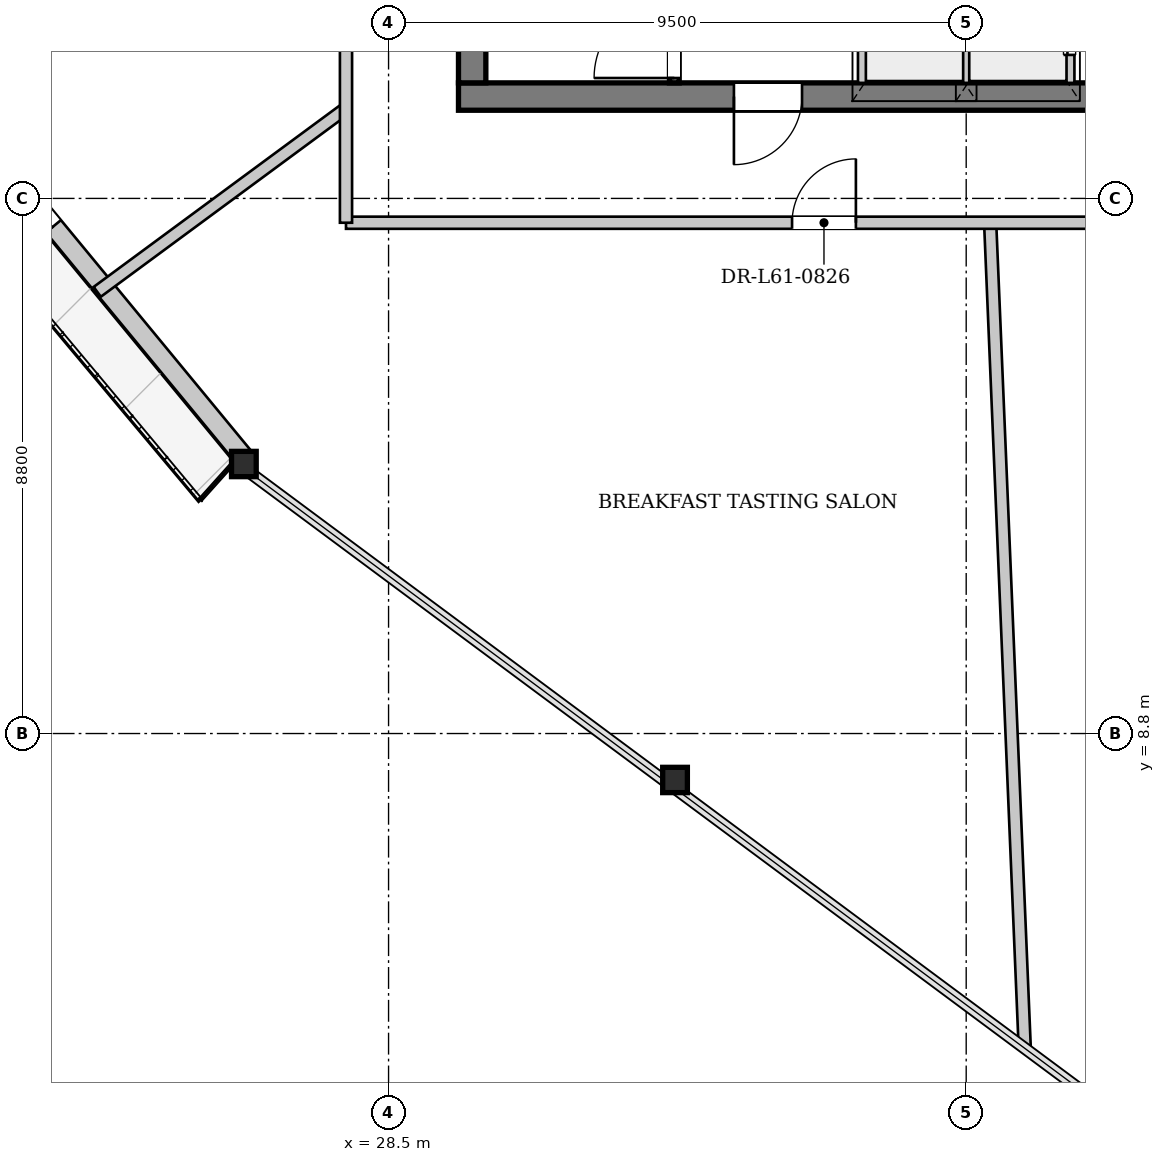
"""IFC4 building model, lengths in metres.
Left out: names, types, materials, properties, quantities, classifications, styles, units other than length and angle.
Written with IfcOpenShell. Run it as: python <this file> out.ifc"""

import sys

from ifc_helpers import new_model, si_unit, direction, frame, frame_2d, origin, origin_2d, place, context, subcontext, project, spatial, rectangle, i_section, extrude, source, transform, mapped, element, fill, save


model = new_model("IFC4")
c1 = context("Model", 3, precision=1e-05, world=origin(), true_north=direction((0.0, 1.0)))
c2 = subcontext(c1, "Body", "Model", "MODEL_VIEW")
j1 = project(units=[si_unit("LENGTHUNIT", "METRE"), si_unit("PLANEANGLEUNIT", "RADIAN")], contexts=[c1])
p1 = place(None, origin())
s1 = spatial("IfcSite", under=j1, at=p1, CompositionType="ELEMENT")
p2 = place(p1, origin())
s2 = spatial("IfcBuilding", under=s1, at=p2, CompositionType="ELEMENT")
p3 = place(p2, frame((0.0, 0.0, 230.9)))
s3 = spatial("IfcBuildingStorey", under=s2, at=p3, CompositionType="ELEMENT", Elevation=230.9)
m1 = source(origin(), c2, "Body", "SweptSolid", [
    extrude(i_section(OverallWidth=0.406, OverallDepth=0.416, WebThickness=0.027, FlangeThickness=0.042, at=origin_2d()), origin(), (0.0, 0.0, 1.0), 3.449),
])
p4 = place(p3, frame((25.969, 13.275, 0.0), z_axis=(0.087482925626, -0.024631114982, 0.995861459189), x_axis=(0.271016201839, 0.962574785843, 0.0)))
e1 = element("IfcColumn", 1, at=p4, inside=s3, PredefinedType="COLUMN", context=c2, shape_type="MappedRepresentation", body=[
    mapped(m1, transform((0.0, 0.0, 0.0), x_axis=(1.0, 0.0, 0.0), y_axis=(0.0, 1.0, 0.0), z_axis=(0.0, 0.0, 1.0), scale=1.0)),
])
m2 = source(origin(), c2, "Body", "SweptSolid", [
    extrude(i_section(OverallWidth=0.406, OverallDepth=0.416, WebThickness=0.027, FlangeThickness=0.042, at=origin_2d()), origin(), (0.0, 0.0, 1.0), 3.454),
])
p5 = place(p3, frame((33.032, 8.029, 0.0), z_axis=(0.103911055621, 0.004311955369, 0.994577246653), x_axis=(-0.041460916814, 0.999140126497, 0.0)))
e2 = element("IfcColumn", 2, at=p5, inside=s3, PredefinedType="COLUMN", context=c2, shape_type="MappedRepresentation", body=[
    mapped(m2, transform((0.0, 0.0, 0.0), x_axis=(1.0, 0.0, 0.0), y_axis=(0.0, 1.0, 0.0), z_axis=(0.0, 0.0, 1.0), scale=1.0)),
])
m3 = source(origin(), c2, "Body", "SweptSolid", [
    extrude(i_section(OverallWidth=0.305, OverallDepth=0.62, WebThickness=0.021, FlangeThickness=0.04, at=origin_2d()), origin(), (0.0, 0.0, 1.0), 3.462),
])
p6 = place(p3, frame((40.095, 2.783, 0.0), z_axis=(0.120094666546, 0.033144153421, 0.992209018383), x_axis=(-0.266037825823, 0.963962590162, 0.0)))
e3 = element("IfcColumn", 3, at=p6, inside=s3, PredefinedType="COLUMN", context=c2, shape_type="MappedRepresentation", body=[
    mapped(m3, transform((0.0, 0.0, 0.0), x_axis=(1.0, 0.0, 0.0), y_axis=(0.0, 1.0, 0.0), z_axis=(0.0, 0.0, 1.0), scale=1.0)),
])
p7 = place(p3, frame((26.093, 13.376, 0.0), z_axis=(0.0, 0.0, 1.0), x_axis=(-0.636168686104, 0.771550000208, 0.0)))
e4 = element("IfcWall", 4, at=p7, inside=s3, PredefinedType="SOLIDWALL", context=c2, shape_type="SweptSolid", body=[
    extrude(rectangle(XDim=17.595, YDim=0.32, at=frame_2d((8.798, 0.0))), origin(), (0.0, 0.0, 1.0), 2.872),
])
p8 = place(p7, frame((4.88, 0.0, 0.0)))
e5 = element("IfcOpeningElement", 5, at=p8, cuts=e4, PredefinedType="OPENING", context=c2, shape_type="SweptSolid", body=[
    extrude(rectangle(XDim=1.5, YDim=2.3, at=frame_2d((0.75, 1.15))), frame((0.0, 0.17, 0.0), z_axis=(0.0, -1.0, 0.0), x_axis=(1.0, 0.0, 0.0)), (0.0, 0.0, 1.0), 0.34),
])
p9 = place(p7, frame((11.721, 0.0, 0.402)))
e6 = element("IfcOpeningElement", 6, at=p9, cuts=e4, PredefinedType="OPENING", context=c2, shape_type="SweptSolid", body=[
    extrude(rectangle(XDim=2.6, YDim=2.35, at=frame_2d((1.3, 1.175))), frame((0.0, 0.17, 0.0), z_axis=(0.0, -1.0, 0.0), x_axis=(1.0, 0.0, 0.0)), (0.0, 0.0, 1.0), 0.34),
])
p10 = place(p3, frame((46.35, 19.275, 0.0), z_axis=(0.0, 0.0, 1.0), x_axis=(-1.0, 0.0, 0.0)))
e7 = element("IfcWall", 7, at=p10, inside=s3, PredefinedType="SHEAR", context=c2, shape_type="SweptSolid", body=[
    extrude(rectangle(XDim=16.7, YDim=0.45, at=frame_2d((8.35, 0.0))), origin(), (0.0, 0.0, 1.0), 3.38),
])
p11 = place(p10, frame((4.55, 0.0, 0.0)))
e8 = element("IfcOpeningElement", 8, at=p11, cuts=e7, PredefinedType="OPENING", context=c2, shape_type="SweptSolid", body=[
    extrude(rectangle(XDim=1.12, YDim=2.25, at=frame_2d((0.56, 1.125))), frame((0.0, 0.235, 0.0), z_axis=(0.0, -1.0, 0.0), x_axis=(1.0, 0.0, 0.0)), (0.0, 0.0, 1.0), 0.47),
])
p12 = place(p10, frame((11.05, 0.0, 0.0)))
e9 = element("IfcOpeningElement", 9, at=p12, cuts=e7, PredefinedType="OPENING", context=c2, shape_type="SweptSolid", body=[
    extrude(rectangle(XDim=1.12, YDim=2.25, at=frame_2d((0.56, 1.125))), frame((0.0, 0.235, 0.0), z_axis=(0.0, -1.0, 0.0), x_axis=(1.0, 0.0, 0.0)), (0.0, 0.0, 1.0), 0.47),
])
p13 = place(p3, frame((29.875, 19.5, 0.0), z_axis=(0.0, 0.0, 1.0), x_axis=(0.0, 1.0, 0.0)))
e10 = element("IfcWall", 10, at=p13, inside=s3, PredefinedType="SHEAR", context=c2, shape_type="SweptSolid", body=[
    extrude(rectangle(XDim=14.2, YDim=0.45, at=frame_2d((7.1, 0.0))), origin(), (0.0, 0.0, 1.0), 3.38),
])
p14 = place(p13, frame((7.42, 0.0, 0.0)))
e11 = element("IfcOpeningElement", 11, at=p14, cuts=e10, PredefinedType="OPENING", context=c2, shape_type="SweptSolid", body=[
    extrude(rectangle(XDim=1.6, YDim=2.2, at=frame_2d((0.8, 1.1))), frame((0.0, 0.235, 0.0), z_axis=(0.0, -1.0, 0.0), x_axis=(1.0, 0.0, 0.0)), (0.0, 0.0, 1.0), 0.47),
])
p15 = place(p3, frame((33.2, 19.5, 0.0), z_axis=(0.0, 0.0, 1.0), x_axis=(0.0, 1.0, 0.0)))
e12 = element("IfcWall", 12, at=p15, inside=s3, PredefinedType="PARTITIONING", context=c2, shape_type="SweptSolid", body=[
    extrude(rectangle(XDim=7.46, YDim=0.16, at=frame_2d((3.73, 0.0))), origin(), (0.0, 0.0, 1.0), 3.38),
])
p16 = place(p15, frame((0.08, 0.0, 0.0)))
e13 = element("IfcOpeningElement", 13, at=p16, cuts=e12, PredefinedType="OPENING", context=c2, shape_type="SweptSolid", body=[
    extrude(rectangle(XDim=1.32, YDim=2.2, at=frame_2d((0.66, 1.1))), frame((0.0, 0.09, 0.0), z_axis=(0.0, -1.0, 0.0), x_axis=(1.0, 0.0, 0.0)), (0.0, 0.0, 1.0), 0.18),
])
p17 = place(p3, frame((36.3, 19.5, 0.0), z_axis=(0.0, 0.0, 1.0), x_axis=(0.0, 1.0, 0.0)))
e14 = element("IfcWall", 14, at=p17, inside=s3, PredefinedType="PARTITIONING", context=c2, shape_type="SweptSolid", body=[
    extrude(rectangle(XDim=4.78, YDim=0.16, at=frame_2d((2.39, 0.0))), origin(), (0.0, 0.0, 1.0), 3.38),
])
p18 = place(p17, frame((0.6, 0.0, 0.0)))
e15 = element("IfcOpeningElement", 15, at=p18, cuts=e14, PredefinedType="OPENING", context=c2, shape_type="SweptSolid", body=[
    extrude(rectangle(XDim=1.2, YDim=2.2, at=frame_2d((0.6, 1.1))), frame((0.0, 0.09, 0.0), z_axis=(0.0, -1.0, 0.0), x_axis=(1.0, 0.0, 0.0)), (0.0, 0.0, 1.0), 0.18),
])
p19 = place(p17, frame((2.65, 0.0, 0.0)))
e16 = element("IfcOpeningElement", 16, at=p19, cuts=e14, PredefinedType="OPENING", context=c2, shape_type="SweptSolid", body=[
    extrude(rectangle(XDim=0.95, YDim=2.1, at=frame_2d((0.475, 1.05))), frame((0.0, 0.09, 0.0), z_axis=(0.0, -1.0, 0.0), x_axis=(1.0, 0.0, 0.0)), (0.0, 0.0, 1.0), 0.18),
])
p20 = place(p3, frame((39.7, 24.28, 0.0), z_axis=(0.0, 0.0, 1.0), x_axis=(0.0, -1.0, 0.0)))
e17 = element("IfcWall", 17, at=p20, inside=s3, PredefinedType="PARTITIONING", context=c2, shape_type="SweptSolid", body=[
    extrude(rectangle(XDim=4.78, YDim=0.16, at=frame_2d((2.39, 0.0))), origin(), (0.0, 0.0, 1.0), 3.38),
])
p21 = place(p20, frame((3.12, 0.0, 0.0)))
e18 = element("IfcOpeningElement", 18, at=p21, cuts=e17, PredefinedType="OPENING", context=c2, shape_type="SweptSolid", body=[
    extrude(rectangle(XDim=1.2, YDim=2.2, at=frame_2d((0.6, 1.1))), frame((0.0, 0.09, 0.0), z_axis=(0.0, -1.0, 0.0), x_axis=(1.0, 0.0, 0.0)), (0.0, 0.0, 1.0), 0.18),
])
p22 = place(p3, frame((38.0, 19.5, 0.0), z_axis=(0.0, 0.0, 1.0), x_axis=(0.0, 1.0, 0.0)))
e19 = element("IfcWall", 19, at=p22, inside=s3, PredefinedType="PARTITIONING", context=c2, shape_type="SweptSolid", body=[
    extrude(rectangle(XDim=2.46, YDim=0.125, at=frame_2d((1.23, 0.0))), origin(), (0.0, 0.0, 1.0), 3.38),
])
p23 = place(p3, frame((27.8, 19.08, 0.0), z_axis=(0.0, 0.0, 1.0), x_axis=(-0.804918187544, -0.593385803134, 0.0)))
e20 = element("IfcWall", 20, at=p23, inside=s3, PredefinedType="PARTITIONING", context=c2, shape_type="SweptSolid", body=[
    extrude(rectangle(XDim=5.083, YDim=0.2, at=frame_2d((2.542, 0.0))), origin(), (0.0, 0.0, 1.0), 3.38),
])
p24 = place(p3, frame((38.394, 17.2, 0.0), z_axis=(0.0, 0.0, 1.0), x_axis=(0.041874116011, -0.999122894547, 0.0)))
e21 = element("IfcWall", 21, at=p24, inside=s3, PredefinedType="PARTITIONING", context=c2, shape_type="SweptSolid", body=[
    extrude(rectangle(XDim=13.55, YDim=0.2, at=frame_2d((6.775, 0.0))), origin(), (0.0, 0.0, 1.0), 3.38),
])
p25 = place(p3, frame((27.8, 17.2, 0.0), z_axis=(0.0, 0.0, 1.0), x_axis=(1.0, 0.0, 0.0)))
e22 = element("IfcWall", 22, at=p25, inside=s3, PredefinedType="PARTITIONING", context=c2, shape_type="SweptSolid", body=[
    extrude(rectangle(XDim=20.4, YDim=0.2, at=frame_2d((10.2, 0.0))), origin(), (0.0, 0.0, 1.0), 3.38),
])
p26 = place(p25, frame((7.336, 0.0, 0.0)))
e23 = element("IfcOpeningElement", 23, at=p26, cuts=e22, PredefinedType="OPENING", context=c2, shape_type="SweptSolid", body=[
    extrude(rectangle(XDim=1.05, YDim=2.2, at=frame_2d((0.525, 1.1))), frame((0.0, 0.11, 0.0), z_axis=(0.0, -1.0, 0.0), x_axis=(1.0, 0.0, 0.0)), (0.0, 0.0, 1.0), 0.22),
])
p27 = place(p25, frame((14.156, 0.0, 0.0)))
e24 = element("IfcOpeningElement", 24, at=p27, cuts=e22, PredefinedType="OPENING", context=c2, shape_type="SweptSolid", body=[
    extrude(rectangle(XDim=1.05, YDim=2.2, at=frame_2d((0.525, 1.1))), frame((0.0, 0.11, 0.0), z_axis=(0.0, -1.0, 0.0), x_axis=(1.0, 0.0, 0.0)), (0.0, 0.0, 1.0), 0.22),
])
p28 = place(p3, frame((27.8, 17.2, 0.0), z_axis=(0.0, 0.0, 1.0), x_axis=(0.0, 1.0, 0.0)))
e25 = element("IfcWall", 25, at=p28, inside=s3, PredefinedType="PARTITIONING", context=c2, shape_type="SweptSolid", body=[
    extrude(rectangle(XDim=18.8, YDim=0.2, at=frame_2d((9.4, 0.0))), origin(), (0.0, 0.0, 1.0), 3.38),
])
p29 = place(p28, frame((15.86, 0.0, 0.0)))
e26 = element("IfcOpeningElement", 26, at=p29, cuts=e25, PredefinedType="OPENING", context=c2, shape_type="SweptSolid", body=[
    extrude(rectangle(XDim=1.05, YDim=2.2, at=frame_2d((0.525, 1.1))), frame((0.0, 0.11, 0.0), z_axis=(0.0, -1.0, 0.0), x_axis=(1.0, 0.0, 0.0)), (0.0, 0.0, 1.0), 0.22),
])
p30 = place(p28, frame((4.436, 0.0, 0.0)))
e27 = element("IfcOpeningElement", 27, at=p30, cuts=e25, PredefinedType="OPENING", context=c2, shape_type="SweptSolid", body=[
    extrude(rectangle(XDim=1.05, YDim=2.2, at=frame_2d((0.525, 1.1))), frame((0.0, 0.11, 0.0), z_axis=(0.0, -1.0, 0.0), x_axis=(1.0, 0.0, 0.0)), (0.0, 0.0, 1.0), 0.22),
])
m4 = source(origin(), c2, "Body", "SweptSolid", [
    extrude(rectangle(XDim=1.5, YDim=2.3, at=frame_2d((0.75, 1.15))), frame((0.0, 0.025, 0.0), z_axis=(0.0, -1.0, 0.0), x_axis=(1.0, 0.0, 0.0)), (0.0, 0.0, 1.0), 0.05),
])
p31 = place(p8, origin())
e28 = element("IfcDoor", 28, at=p31, inside=s3, OperationType="DOUBLE_DOOR_SINGLE_SWING", PredefinedType="DOOR", context=c2, shape_type="MappedRepresentation", body=[
    mapped(m4, transform((0.0, 0.0, 0.0), x_axis=(1.0, 0.0, 0.0), y_axis=(0.0, 1.0, 0.0), z_axis=(0.0, 0.0, 1.0), scale=1.0)),
])
fill(e5, e28)
m5 = source(origin(), c2, "Body", "SweptSolid", [
    extrude(rectangle(XDim=1.12, YDim=2.25, at=frame_2d((0.56, 1.125))), frame((0.0, 0.025, 0.0), z_axis=(0.0, -1.0, 0.0), x_axis=(1.0, 0.0, 0.0)), (0.0, 0.0, 1.0), 0.05),
])
p32 = place(p12, origin())
e29 = element("IfcDoor", 29, at=p32, inside=s3, OperationType="SINGLE_SWING_RIGHT", PredefinedType="DOOR", context=c2, shape_type="MappedRepresentation", body=[
    mapped(m5, transform((0.0, 0.0, 0.0), x_axis=(1.0, 0.0, 0.0), y_axis=(0.0, 1.0, 0.0), z_axis=(0.0, 0.0, 1.0), scale=1.0)),
])
fill(e9, e29)
m6 = source(origin(), c2, "Body", "SweptSolid", [
    extrude(rectangle(XDim=1.32, YDim=2.2, at=frame_2d((0.66, 1.1))), frame((0.0, 0.025, 0.0), z_axis=(0.0, -1.0, 0.0), x_axis=(1.0, 0.0, 0.0)), (0.0, 0.0, 1.0), 0.05),
])
p33 = place(p16, origin())
e30 = element("IfcDoor", 30, at=p33, inside=s3, OperationType="SINGLE_SWING_LEFT", PredefinedType="DOOR", context=c2, shape_type="MappedRepresentation", body=[
    mapped(m6, transform((0.0, 0.0, 0.0), x_axis=(1.0, 0.0, 0.0), y_axis=(0.0, 1.0, 0.0), z_axis=(0.0, 0.0, 1.0), scale=1.0)),
])
fill(e13, e30)
m7 = source(origin(), c2, "Body", "SweptSolid", [
    extrude(rectangle(XDim=1.2, YDim=2.2, at=frame_2d((0.6, 1.1))), frame((0.0, 0.025, 0.0), z_axis=(0.0, -1.0, 0.0), x_axis=(1.0, 0.0, 0.0)), (0.0, 0.0, 1.0), 0.05),
])
p34 = place(p21, origin())
e31 = element("IfcDoor", 31, at=p34, inside=s3, OperationType="DOUBLE_DOOR_SLIDING", PredefinedType="DOOR", context=c2, shape_type="MappedRepresentation", body=[
    mapped(m7, transform((0.0, 0.0, 0.0), x_axis=(1.0, 0.0, 0.0), y_axis=(0.0, 1.0, 0.0), z_axis=(0.0, 0.0, 1.0), scale=1.0)),
])
fill(e18, e31)
m8 = source(origin(), c2, "Body", "SweptSolid", [
    extrude(rectangle(XDim=1.05, YDim=2.2, at=frame_2d((0.525, 1.1))), frame((0.0, 0.025, 0.0), z_axis=(0.0, -1.0, 0.0), x_axis=(1.0, 0.0, 0.0)), (0.0, 0.0, 1.0), 0.05),
])
p35 = place(p26, origin())
e32 = element("IfcDoor", 32, at=p35, inside=s3, OperationType="SINGLE_SWING_RIGHT", PredefinedType="DOOR", context=c2, shape_type="MappedRepresentation", body=[
    mapped(m8, transform((0.0, 0.0, 0.0), x_axis=(1.0, 0.0, 0.0), y_axis=(0.0, 1.0, 0.0), z_axis=(0.0, 0.0, 1.0), scale=1.0)),
])
fill(e23, e32)
save(model, sys.argv[1])
